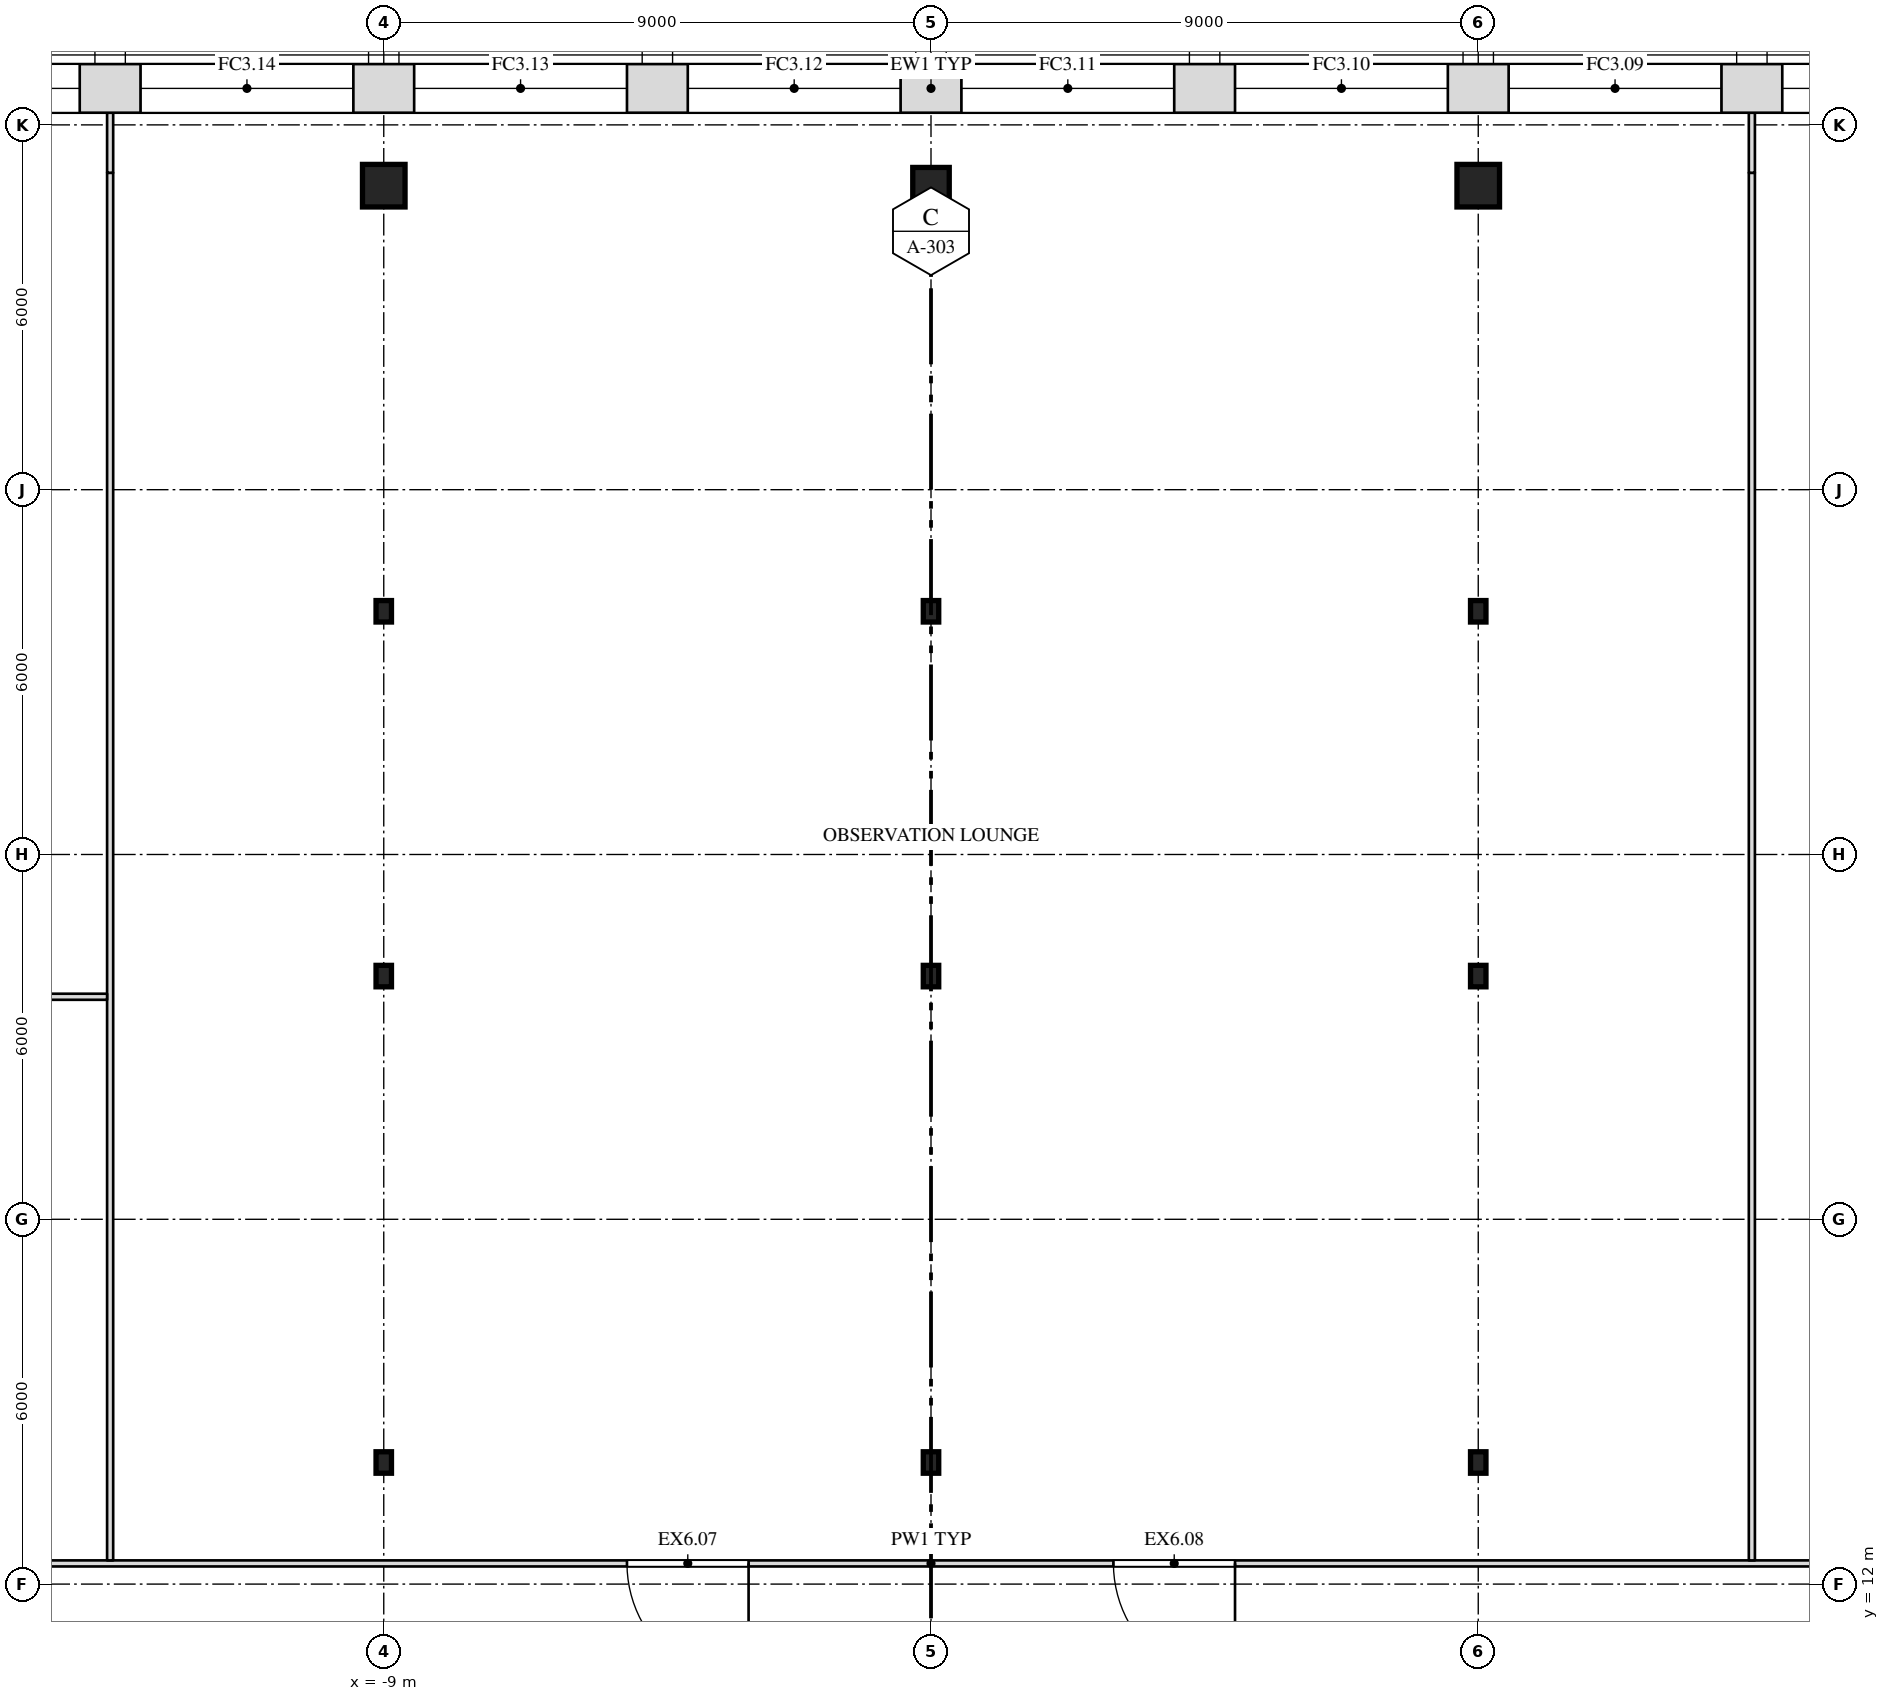
"""IFC4 building model, lengths in metres.
Left out: names, types, materials, properties, quantities, classifications, styles, units other than length and angle.
Written with IfcOpenShell. Run it as: python <this file> out.ifc"""

import sys

from ifc_helpers import new_model, si_unit, direction, frame, frame_2d, origin, origin_2d, place, context, subcontext, project, spatial, rectangle, i_section, extrude, element, fill, save


model = new_model("IFC4")
c1 = context("Model", 3, precision=1e-05, world=origin(), true_north=direction((0.0, 1.0)))
c2 = subcontext(c1, "Body", "Model", "MODEL_VIEW")
j1 = project(units=[si_unit("LENGTHUNIT", "METRE"), si_unit("PLANEANGLEUNIT", "RADIAN")], contexts=[c1])
p1 = place(None, origin())
s1 = spatial("IfcSite", under=j1, at=p1, CompositionType="ELEMENT")
p2 = place(p1, origin())
s2 = spatial("IfcBuilding", under=s1, at=p2, CompositionType="ELEMENT")
p3 = place(p2, frame((0.0, 0.0, 292.5)))
s3 = spatial("IfcBuildingStorey", under=s2, at=p3, CompositionType="ELEMENT", Elevation=292.5)
for number, where, z_axis, x_axis in (
    (1, (-9.0, 14.0, 0.0), (0.0, 0.0, 1.0), (1.0, 0.0, 0.0)),
    (2, (0.0, 14.0, 0.0), (0.0, 0.0, 1.0), (1.0, 0.0, 0.0)),
    (3, (9.0, 14.0, 0.0), (0.0, 0.0, 1.0), (1.0, 0.0, 0.0)),
    (4, (-9.0, 22.0, 0.0), (0.0, 0.0, 1.0), (1.0, 0.0, 0.0)),
    (5, (0.0, 22.0, 0.0), (0.0, 0.0, 1.0), (1.0, 0.0, 0.0)),
    (6, (9.0, 22.0, 0.0), (0.0, 0.0, 1.0), (1.0, 0.0, 0.0)),
    (7, (-9.0, 28.0, 0.0), (0.0, 0.0, 1.0), (1.0, 0.0, 0.0)),
    (8, (0.0, 28.0, 0.0), (0.0, 0.0, 1.0), (1.0, 0.0, 0.0)),
    (9, (9.0, 28.0, 0.0), (0.0, 0.0, 1.0), (1.0, 0.0, 0.0)),
):
    element("IfcColumn", number, at=place(p3, frame(where, z_axis=z_axis, x_axis=x_axis)), inside=s3, PredefinedType="COLUMN", context=c2, shape_type="SweptSolid", body=[
        extrude(i_section(OverallWidth=0.254, OverallDepth=0.353, WebThickness=0.01, FlangeThickness=0.016, at=origin_2d()), origin(), (0.0, 0.0, 1.0), 4.0),
    ])
p4 = place(p3, frame((-9.0, 35.0, 0.0), z_axis=(0.0, 0.0, 1.0), x_axis=(1.0, 0.0, 0.0)))
e10 = element("IfcColumn", 10, at=p4, inside=s3, PredefinedType="COLUMN", context=c2, shape_type="SweptSolid", body=[
    extrude(rectangle(XDim=0.7, YDim=0.7, at=origin_2d()), origin(), (0.0, 0.0, 1.0), 4.0),
])
p5 = place(p3, frame((0.0, 35.0, 0.0), z_axis=(0.0, 0.0, 1.0), x_axis=(1.0, 0.0, 0.0)))
e11 = element("IfcColumn", 11, at=p5, inside=s3, PredefinedType="COLUMN", context=c2, shape_type="SweptSolid", body=[
    extrude(rectangle(XDim=0.6, YDim=0.6, at=origin_2d()), origin(), (0.0, 0.0, 1.0), 4.0),
])
p6 = place(p3, frame((9.0, 35.0, 0.0), z_axis=(0.0, 0.0, 1.0), x_axis=(1.0, 0.0, 0.0)))
e12 = element("IfcColumn", 12, at=p6, inside=s3, PredefinedType="COLUMN", context=c2, shape_type="SweptSolid", body=[
    extrude(rectangle(XDim=0.7, YDim=0.7, at=origin_2d()), origin(), (0.0, 0.0, 1.0), 4.0),
])
p7 = place(p3, frame((-29.2, 12.34, 0.0), z_axis=(0.0, 0.0, 1.0), x_axis=(1.0, 0.0, 0.0)))
e13 = element("IfcWall", 13, at=p7, inside=s3, PredefinedType="PARTITIONING", context=c2, shape_type="SweptSolid", body=[
    extrude(rectangle(XDim=58.4, YDim=0.1, at=frame_2d((29.2, 0.0))), origin(), (0.0, 0.0, 1.0), 3.6),
])
p8 = place(p7, frame((6.95, 0.0, 0.0)))
e14 = element("IfcOpeningElement", 14, at=p8, cuts=e13, PredefinedType="OPENING", context=c2, shape_type="SweptSolid", body=[
    extrude(rectangle(XDim=1.8, YDim=2.1, at=frame_2d((0.9, 1.05))), frame((0.0, 0.062, 0.0), z_axis=(0.0, -1.0, 0.0), x_axis=(1.0, 0.0, 0.0)), (0.0, 0.0, 1.0), 0.124),
])
p9 = place(p7, frame((24.2, 0.0, 0.0)))
e15 = element("IfcOpeningElement", 15, at=p9, cuts=e13, PredefinedType="OPENING", context=c2, shape_type="SweptSolid", body=[
    extrude(rectangle(XDim=2.0, YDim=2.4, at=frame_2d((1.0, 1.2))), frame((0.0, 0.062, 0.0), z_axis=(0.0, -1.0, 0.0), x_axis=(1.0, 0.0, 0.0)), (0.0, 0.0, 1.0), 0.124),
])
p10 = place(p7, frame((32.2, 0.0, 0.0)))
e16 = element("IfcOpeningElement", 16, at=p10, cuts=e13, PredefinedType="OPENING", context=c2, shape_type="SweptSolid", body=[
    extrude(rectangle(XDim=2.0, YDim=2.4, at=frame_2d((1.0, 1.2))), frame((0.0, 0.062, 0.0), z_axis=(0.0, -1.0, 0.0), x_axis=(1.0, 0.0, 0.0)), (0.0, 0.0, 1.0), 0.124),
])
p11 = place(p7, frame((49.55, 0.0, 0.0)))
e17 = element("IfcOpeningElement", 17, at=p11, cuts=e13, PredefinedType="OPENING", context=c2, shape_type="SweptSolid", body=[
    extrude(rectangle(XDim=2.0, YDim=2.4, at=frame_2d((1.0, 1.2))), frame((0.0, 0.062, 0.0), z_axis=(0.0, -1.0, 0.0), x_axis=(1.0, 0.0, 0.0)), (0.0, 0.0, 1.0), 0.124),
])
p12 = place(p3, frame((-13.5, 12.39, 0.0), z_axis=(0.0, 0.0, 1.0), x_axis=(0.0, 1.0, 0.0)))
e18 = element("IfcWall", 18, at=p12, inside=s3, PredefinedType="PARTITIONING", context=c2, shape_type="SweptSolid", body=[
    extrude(rectangle(XDim=22.822, YDim=0.1, at=frame_2d((11.411, 0.0))), origin(), (0.0, 0.0, 1.0), 2.988),
])
p13 = place(p3, frame((-13.5, 35.212, 0.0), z_axis=(0.0, 0.0, 1.0), x_axis=(0.0, 1.0, 0.0)))
e19 = element("IfcWall", 19, at=p13, inside=s3, PredefinedType="PARTITIONING", context=c2, shape_type="SweptSolid", body=[
    extrude(rectangle(XDim=0.988, YDim=0.1, at=frame_2d((0.494, 0.0))), origin(), (0.0, 0.0, 1.0), 3.6),
])
p14 = place(p3, frame((13.5, 12.39, 0.0), z_axis=(0.0, 0.0, 1.0), x_axis=(0.0, 1.0, 0.0)))
e20 = element("IfcWall", 20, at=p14, inside=s3, PredefinedType="PARTITIONING", context=c2, shape_type="SweptSolid", body=[
    extrude(rectangle(XDim=22.822, YDim=0.1, at=frame_2d((11.411, 0.0))), origin(), (0.0, 0.0, 1.0), 2.988),
])
p15 = place(p3, frame((13.5, 35.212, 0.0), z_axis=(0.0, 0.0, 1.0), x_axis=(0.0, 1.0, 0.0)))
e21 = element("IfcWall", 21, at=p15, inside=s3, PredefinedType="PARTITIONING", context=c2, shape_type="SweptSolid", body=[
    extrude(rectangle(XDim=0.988, YDim=0.1, at=frame_2d((0.494, 0.0))), origin(), (0.0, 0.0, 1.0), 3.6),
])
p16 = place(p3, frame((-29.2, 21.66, 0.0), z_axis=(0.0, 0.0, 1.0), x_axis=(1.0, 0.0, 0.0)))
e22 = element("IfcWall", 22, at=p16, inside=s3, PredefinedType="PARTITIONING", context=c2, shape_type="SweptSolid", body=[
    extrude(rectangle(XDim=15.65, YDim=0.1, at=frame_2d((7.825, 0.0))), origin(), (0.0, 0.0, 1.0), 3.6),
])
p17 = place(p16, frame((7.4, 0.0, 0.0)))
e23 = element("IfcOpeningElement", 23, at=p17, cuts=e22, PredefinedType="OPENING", context=c2, shape_type="SweptSolid", body=[
    extrude(rectangle(XDim=0.9, YDim=2.1, at=frame_2d((0.45, 1.05))), frame((0.0, 0.062, 0.0), z_axis=(0.0, -1.0, 0.0), x_axis=(1.0, 0.0, 0.0)), (0.0, 0.0, 1.0), 0.124),
])
p18 = place(p3, frame((23.948, 36.6, 0.0), z_axis=(0.0, 0.0, 1.0), x_axis=(-1.0, 0.0, 0.0)))
e24 = element("IfcWall", 24, at=p18, inside=s3, PredefinedType="SOLIDWALL", context=c2, shape_type="SweptSolid", body=[
    extrude(rectangle(XDim=47.895, YDim=0.8, at=frame_2d((23.948, 0.0))), origin(), (0.0, 0.0, 1.0), 3.6),
])
p19 = place(p18, frame((1.948, 0.0, 1.0)))
e25 = element("IfcOpeningElement", 25, at=p19, cuts=e24, PredefinedType="OPENING", context=c2, shape_type="SweptSolid", body=[
    extrude(rectangle(XDim=3.5, YDim=2.3, at=frame_2d((1.75, 1.15))), frame((0.0, 0.412, 0.0), z_axis=(0.0, -1.0, 0.0), x_axis=(1.0, 0.0, 0.0)), (0.0, 0.0, 1.0), 0.824),
])
p20 = place(p18, frame((6.448, 0.0, 1.0)))
e26 = element("IfcOpeningElement", 26, at=p20, cuts=e24, PredefinedType="OPENING", context=c2, shape_type="SweptSolid", body=[
    extrude(rectangle(XDim=3.5, YDim=2.3, at=frame_2d((1.75, 1.15))), frame((0.0, 0.412, 0.0), z_axis=(0.0, -1.0, 0.0), x_axis=(1.0, 0.0, 0.0)), (0.0, 0.0, 1.0), 0.824),
])
p21 = place(p18, frame((10.948, 0.0, 1.0)))
e27 = element("IfcOpeningElement", 27, at=p21, cuts=e24, PredefinedType="OPENING", context=c2, shape_type="SweptSolid", body=[
    extrude(rectangle(XDim=3.5, YDim=2.3, at=frame_2d((1.75, 1.15))), frame((0.0, 0.412, 0.0), z_axis=(0.0, -1.0, 0.0), x_axis=(1.0, 0.0, 0.0)), (0.0, 0.0, 1.0), 0.824),
])
p22 = place(p18, frame((15.448, 0.0, 1.0)))
e28 = element("IfcOpeningElement", 28, at=p22, cuts=e24, PredefinedType="OPENING", context=c2, shape_type="SweptSolid", body=[
    extrude(rectangle(XDim=3.5, YDim=2.3, at=frame_2d((1.75, 1.15))), frame((0.0, 0.412, 0.0), z_axis=(0.0, -1.0, 0.0), x_axis=(1.0, 0.0, 0.0)), (0.0, 0.0, 1.0), 0.824),
])
p23 = place(p18, frame((19.948, 0.0, 1.0)))
e29 = element("IfcOpeningElement", 29, at=p23, cuts=e24, PredefinedType="OPENING", context=c2, shape_type="SweptSolid", body=[
    extrude(rectangle(XDim=3.5, YDim=2.3, at=frame_2d((1.75, 1.15))), frame((0.0, 0.412, 0.0), z_axis=(0.0, -1.0, 0.0), x_axis=(1.0, 0.0, 0.0)), (0.0, 0.0, 1.0), 0.824),
])
p24 = place(p18, frame((24.448, 0.0, 1.0)))
e30 = element("IfcOpeningElement", 30, at=p24, cuts=e24, PredefinedType="OPENING", context=c2, shape_type="SweptSolid", body=[
    extrude(rectangle(XDim=3.5, YDim=2.3, at=frame_2d((1.75, 1.15))), frame((0.0, 0.412, 0.0), z_axis=(0.0, -1.0, 0.0), x_axis=(1.0, 0.0, 0.0)), (0.0, 0.0, 1.0), 0.824),
])
p25 = place(p18, frame((28.948, 0.0, 1.0)))
e31 = element("IfcOpeningElement", 31, at=p25, cuts=e24, PredefinedType="OPENING", context=c2, shape_type="SweptSolid", body=[
    extrude(rectangle(XDim=3.5, YDim=2.3, at=frame_2d((1.75, 1.15))), frame((0.0, 0.412, 0.0), z_axis=(0.0, -1.0, 0.0), x_axis=(1.0, 0.0, 0.0)), (0.0, 0.0, 1.0), 0.824),
])
p26 = place(p18, frame((33.448, 0.0, 1.0)))
e32 = element("IfcOpeningElement", 32, at=p26, cuts=e24, PredefinedType="OPENING", context=c2, shape_type="SweptSolid", body=[
    extrude(rectangle(XDim=3.5, YDim=2.3, at=frame_2d((1.75, 1.15))), frame((0.0, 0.412, 0.0), z_axis=(0.0, -1.0, 0.0), x_axis=(1.0, 0.0, 0.0)), (0.0, 0.0, 1.0), 0.824),
])
p27 = place(p18, frame((37.948, 0.0, 1.0)))
e33 = element("IfcOpeningElement", 33, at=p27, cuts=e24, PredefinedType="OPENING", context=c2, shape_type="SweptSolid", body=[
    extrude(rectangle(XDim=3.5, YDim=2.3, at=frame_2d((1.75, 1.15))), frame((0.0, 0.412, 0.0), z_axis=(0.0, -1.0, 0.0), x_axis=(1.0, 0.0, 0.0)), (0.0, 0.0, 1.0), 0.824),
])
p28 = place(p18, frame((42.448, 0.0, 1.0)))
e34 = element("IfcOpeningElement", 34, at=p28, cuts=e24, PredefinedType="OPENING", context=c2, shape_type="SweptSolid", body=[
    extrude(rectangle(XDim=3.5, YDim=2.3, at=frame_2d((1.75, 1.15))), frame((0.0, 0.412, 0.0), z_axis=(0.0, -1.0, 0.0), x_axis=(1.0, 0.0, 0.0)), (0.0, 0.0, 1.0), 0.824),
])
p29 = place(p9, origin())
e35 = element("IfcDoor", 35, at=p29, inside=s3, OperationType="DOUBLE_DOOR_SINGLE_SWING", PredefinedType="DOOR", context=c2, shape_type="SweptSolid", body=[
    extrude(rectangle(XDim=2.0, YDim=2.4, at=frame_2d((1.0, 1.2))), frame((0.0, 0.025, 0.0), z_axis=(0.0, -1.0, 0.0), x_axis=(1.0, 0.0, 0.0)), (0.0, 0.0, 1.0), 0.05),
])
fill(e15, e35)
p30 = place(p10, origin())
e36 = element("IfcDoor", 36, at=p30, inside=s3, OperationType="DOUBLE_DOOR_SINGLE_SWING", PredefinedType="DOOR", context=c2, shape_type="SweptSolid", body=[
    extrude(rectangle(XDim=2.0, YDim=2.4, at=frame_2d((1.0, 1.2))), frame((0.0, 0.025, 0.0), z_axis=(0.0, -1.0, 0.0), x_axis=(1.0, 0.0, 0.0)), (0.0, 0.0, 1.0), 0.05),
])
fill(e16, e36)
p31 = place(p20, origin())
e37 = element("IfcWindow", 37, at=p31, inside=s3, PartitioningType="SINGLE_PANEL", PredefinedType="WINDOW", context=c2, shape_type="SweptSolid", body=[
    extrude(rectangle(XDim=3.5, YDim=2.3, at=frame_2d((1.75, 1.15))), frame((0.0, 0.03, 0.0), z_axis=(0.0, -1.0, 0.0), x_axis=(1.0, 0.0, 0.0)), (0.0, 0.0, 1.0), 0.06),
])
fill(e26, e37)
p32 = place(p21, origin())
e38 = element("IfcWindow", 38, at=p32, inside=s3, PartitioningType="SINGLE_PANEL", PredefinedType="WINDOW", context=c2, shape_type="SweptSolid", body=[
    extrude(rectangle(XDim=3.5, YDim=2.3, at=frame_2d((1.75, 1.15))), frame((0.0, 0.03, 0.0), z_axis=(0.0, -1.0, 0.0), x_axis=(1.0, 0.0, 0.0)), (0.0, 0.0, 1.0), 0.06),
])
fill(e27, e38)
p33 = place(p22, origin())
e39 = element("IfcWindow", 39, at=p33, inside=s3, PartitioningType="SINGLE_PANEL", PredefinedType="WINDOW", context=c2, shape_type="SweptSolid", body=[
    extrude(rectangle(XDim=3.5, YDim=2.3, at=frame_2d((1.75, 1.15))), frame((0.0, 0.03, 0.0), z_axis=(0.0, -1.0, 0.0), x_axis=(1.0, 0.0, 0.0)), (0.0, 0.0, 1.0), 0.06),
])
fill(e28, e39)
p34 = place(p23, origin())
e40 = element("IfcWindow", 40, at=p34, inside=s3, PartitioningType="SINGLE_PANEL", PredefinedType="WINDOW", context=c2, shape_type="SweptSolid", body=[
    extrude(rectangle(XDim=3.5, YDim=2.3, at=frame_2d((1.75, 1.15))), frame((0.0, 0.03, 0.0), z_axis=(0.0, -1.0, 0.0), x_axis=(1.0, 0.0, 0.0)), (0.0, 0.0, 1.0), 0.06),
])
fill(e29, e40)
p35 = place(p24, origin())
e41 = element("IfcWindow", 41, at=p35, inside=s3, PartitioningType="SINGLE_PANEL", PredefinedType="WINDOW", context=c2, shape_type="SweptSolid", body=[
    extrude(rectangle(XDim=3.5, YDim=2.3, at=frame_2d((1.75, 1.15))), frame((0.0, 0.03, 0.0), z_axis=(0.0, -1.0, 0.0), x_axis=(1.0, 0.0, 0.0)), (0.0, 0.0, 1.0), 0.06),
])
fill(e30, e41)
p36 = place(p25, origin())
e42 = element("IfcWindow", 42, at=p36, inside=s3, PartitioningType="SINGLE_PANEL", PredefinedType="WINDOW", context=c2, shape_type="SweptSolid", body=[
    extrude(rectangle(XDim=3.5, YDim=2.3, at=frame_2d((1.75, 1.15))), frame((0.0, 0.03, 0.0), z_axis=(0.0, -1.0, 0.0), x_axis=(1.0, 0.0, 0.0)), (0.0, 0.0, 1.0), 0.06),
])
fill(e31, e42)
p37 = place(p26, origin())
e43 = element("IfcWindow", 43, at=p37, inside=s3, PartitioningType="SINGLE_PANEL", PredefinedType="WINDOW", context=c2, shape_type="SweptSolid", body=[
    extrude(rectangle(XDim=3.5, YDim=2.3, at=frame_2d((1.75, 1.15))), frame((0.0, 0.03, 0.0), z_axis=(0.0, -1.0, 0.0), x_axis=(1.0, 0.0, 0.0)), (0.0, 0.0, 1.0), 0.06),
])
fill(e32, e43)
p38 = place(p27, origin())
e44 = element("IfcWindow", 44, at=p38, inside=s3, PartitioningType="SINGLE_PANEL", PredefinedType="WINDOW", context=c2, shape_type="SweptSolid", body=[
    extrude(rectangle(XDim=3.5, YDim=2.3, at=frame_2d((1.75, 1.15))), frame((0.0, 0.03, 0.0), z_axis=(0.0, -1.0, 0.0), x_axis=(1.0, 0.0, 0.0)), (0.0, 0.0, 1.0), 0.06),
])
fill(e33, e44)
save(model, sys.argv[1])
